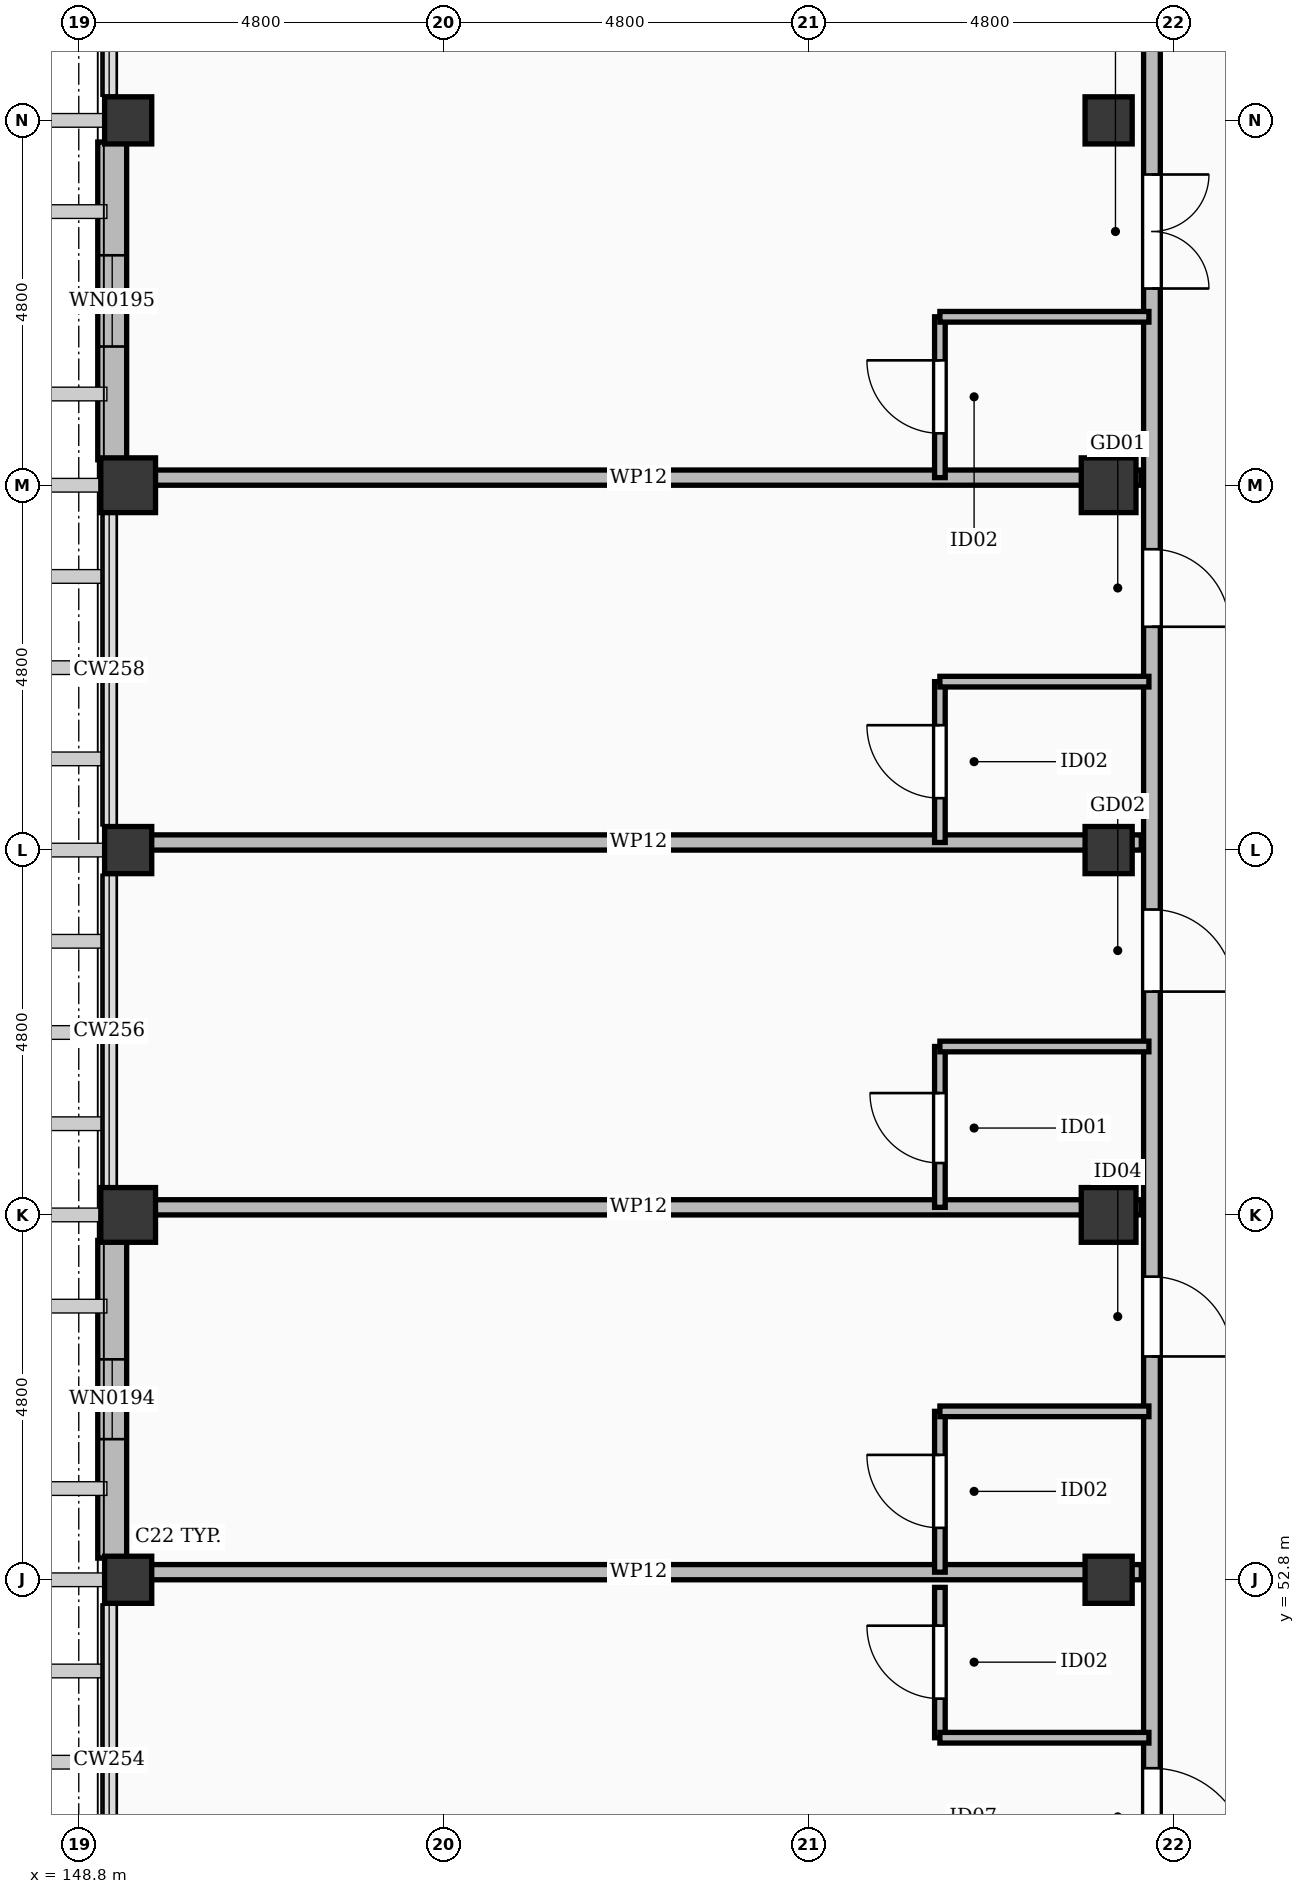
"""IFC4 building model, lengths in metres.
Left out: names, types, materials, properties, quantities, classifications, styles, units other than length and angle.
Written with IfcOpenShell. Run it as: python <this file> out.ifc"""

import sys

from ifc_helpers import new_model, si_unit, direction, frame, frame_2d, origin, origin_2d, place, context, subcontext, project, spatial, rectangle, extrude, element, fill, save


model = new_model("IFC4")
c1 = context("Model", 3, precision=1e-05, world=origin(), true_north=direction((0.0, 1.0)))
c2 = subcontext(c1, "Body", "Model", "MODEL_VIEW")
j1 = project(units=[si_unit("LENGTHUNIT", "METRE"), si_unit("PLANEANGLEUNIT", "RADIAN")], contexts=[c1])
p1 = place(None, origin())
s1 = spatial("IfcSite", under=j1, at=p1, CompositionType="ELEMENT")
p2 = place(p1, origin())
s2 = spatial("IfcBuilding", under=s1, at=p2, CompositionType="ELEMENT")
p3 = place(p2, frame((0.0, 0.0, 31.8)))
s3 = spatial("IfcBuildingStorey", under=s2, at=p3, CompositionType="ELEMENT", Elevation=31.8)
for number, where, z_axis, x_axis in (
    (1, (149.45, 57.6, 0.0), (0.0, 0.0, 1.0), (1.0, 0.0, 0.0)),
    (2, (149.45, 67.2, 0.0), (0.0, 0.0, 1.0), (1.0, 0.0, 0.0)),
    (3, (162.35, 57.6, 0.0), (0.0, 0.0, 1.0), (1.0, 0.0, 0.0)),
    (4, (162.35, 67.2, 0.0), (0.0, 0.0, 1.0), (1.0, 0.0, 0.0)),
):
    element("IfcColumn", number, at=place(p3, frame(where, z_axis=z_axis, x_axis=x_axis)), inside=s3, PredefinedType="COLUMN", context=c2, shape_type="SweptSolid", body=[
        extrude(rectangle(XDim=0.72, YDim=0.72, at=origin_2d()), origin(), (0.0, 0.0, 1.0), 3.6),
    ])
for number, where, z_axis, x_axis in (
    (5, (149.45, 52.8, 0.0), (0.0, 0.0, 1.0), (1.0, 0.0, 0.0)),
    (6, (149.45, 62.4, 0.0), (0.0, 0.0, 1.0), (1.0, 0.0, 0.0)),
    (7, (149.45, 72.0, 0.0), (0.0, 0.0, 1.0), (1.0, 0.0, 0.0)),
    (8, (162.35, 52.8, 0.0), (0.0, 0.0, 1.0), (1.0, 0.0, 0.0)),
    (9, (162.35, 62.4, 0.0), (0.0, 0.0, 1.0), (1.0, 0.0, 0.0)),
    (10, (162.35, 72.0, 0.0), (0.0, 0.0, 1.0), (1.0, 0.0, 0.0)),
):
    element("IfcColumn", number, at=place(p3, frame(where, z_axis=z_axis, x_axis=x_axis)), inside=s3, PredefinedType="COLUMN", context=c2, shape_type="SweptSolid", body=[
        extrude(rectangle(XDim=0.62, YDim=0.62, at=origin_2d()), origin(), (0.0, 0.0, 1.0), 3.6),
    ])
p4 = place(p3, frame((149.24, 53.085, 0.0), z_axis=(0.0, 0.0, 1.0), x_axis=(0.0, 1.0, 0.0)))
e11 = element("IfcWall", 11, at=p4, inside=s3, PredefinedType="SOLIDWALL", context=c2, shape_type="SweptSolid", body=[
    extrude(rectangle(XDim=4.18, YDim=0.38, at=frame_2d((2.09, 0.0))), origin(), (0.0, 0.0, 1.0), 2.732),
])
p5 = place(p4, frame((1.565, 0.0, 0.55)))
e12 = element("IfcOpeningElement", 12, at=p5, cuts=e11, PredefinedType="OPENING", context=c2, shape_type="SweptSolid", body=[
    extrude(rectangle(XDim=1.05, YDim=1.65, at=frame_2d((0.525, 0.825))), frame((0.0, 0.202, 0.0), z_axis=(0.0, -1.0, 0.0), x_axis=(1.0, 0.0, 0.0)), (0.0, 0.0, 1.0), 0.404),
])
p6 = place(p3, frame((149.24, 67.535, 0.0), z_axis=(0.0, 0.0, 1.0), x_axis=(0.0, 1.0, 0.0)))
e13 = element("IfcWall", 13, at=p6, inside=s3, PredefinedType="SOLIDWALL", context=c2, shape_type="SweptSolid", body=[
    extrude(rectangle(XDim=4.18, YDim=0.38, at=frame_2d((2.09, 0.0))), origin(), (0.0, 0.0, 1.0), 2.732),
])
p7 = place(p6, frame((1.49, 0.0, 0.55)))
e14 = element("IfcOpeningElement", 14, at=p7, cuts=e13, PredefinedType="OPENING", context=c2, shape_type="SweptSolid", body=[
    extrude(rectangle(XDim=1.2, YDim=1.72, at=frame_2d((0.6, 0.86))), frame((0.0, 0.202, 0.0), z_axis=(0.0, -1.0, 0.0), x_axis=(1.0, 0.0, 0.0)), (0.0, 0.0, 1.0), 0.404),
])
p8 = place(p3, frame((162.92, 48.35, 0.0), z_axis=(0.0, 0.0, 1.0), x_axis=(0.0, 1.0, 0.0)))
e15 = element("IfcWall", 15, at=p8, inside=s3, PredefinedType="PARTITIONING", context=c2, shape_type="SweptSolid", body=[
    extrude(rectangle(XDim=24.85, YDim=0.22, at=frame_2d((12.425, 0.0))), origin(), (0.0, 0.0, 1.0), 2.732),
])
p9 = place(p8, frame((0.691, 0.0, 0.0)))
e16 = element("IfcOpeningElement", 16, at=p9, cuts=e15, PredefinedType="OPENING", context=c2, shape_type="SweptSolid", body=[
    extrude(rectangle(XDim=1.28, YDim=2.16, at=frame_2d((0.64, 1.08))), frame((0.0, 0.122, 0.0), z_axis=(0.0, -1.0, 0.0), x_axis=(1.0, 0.0, 0.0)), (0.0, 0.0, 1.0), 0.244),
])
p10 = place(p8, frame((7.388, 0.0, 0.0)))
e17 = element("IfcOpeningElement", 17, at=p10, cuts=e15, PredefinedType="OPENING", context=c2, shape_type="SweptSolid", body=[
    extrude(rectangle(XDim=1.05, YDim=2.18, at=frame_2d((0.525, 1.09))), frame((0.0, 0.122, 0.0), z_axis=(0.0, -1.0, 0.0), x_axis=(1.0, 0.0, 0.0)), (0.0, 0.0, 1.0), 0.244),
])
p11 = place(p8, frame((12.188, 0.0, 0.0)))
e18 = element("IfcOpeningElement", 18, at=p11, cuts=e15, PredefinedType="OPENING", context=c2, shape_type="SweptSolid", body=[
    extrude(rectangle(XDim=1.08, YDim=2.25, at=frame_2d((0.54, 1.125))), frame((0.0, 0.122, 0.0), z_axis=(0.0, -1.0, 0.0), x_axis=(1.0, 0.0, 0.0)), (0.0, 0.0, 1.0), 0.244),
])
p12 = place(p8, frame((16.988, 0.0, 0.0)))
e19 = element("IfcOpeningElement", 19, at=p12, cuts=e15, PredefinedType="OPENING", context=c2, shape_type="SweptSolid", body=[
    extrude(rectangle(XDim=1.02, YDim=2.2, at=frame_2d((0.51, 1.1))), frame((0.0, 0.122, 0.0), z_axis=(0.0, -1.0, 0.0), x_axis=(1.0, 0.0, 0.0)), (0.0, 0.0, 1.0), 0.244),
])
p13 = place(p8, frame((21.438, 0.0, 0.0)))
e20 = element("IfcOpeningElement", 20, at=p13, cuts=e15, PredefinedType="OPENING", context=c2, shape_type="SweptSolid", body=[
    extrude(rectangle(XDim=1.5, YDim=2.3, at=frame_2d((0.75, 1.15))), frame((0.0, 0.122, 0.0), z_axis=(0.0, -1.0, 0.0), x_axis=(1.0, 0.0, 0.0)), (0.0, 0.0, 1.0), 0.244),
])
p14 = place(p3, frame((160.13, 50.722, 0.0), z_axis=(0.0, 0.0, 1.0), x_axis=(0.0, 1.0, 0.0)))
e21 = element("IfcWall", 21, at=p14, inside=s3, PredefinedType="PARTITIONING", context=c2, shape_type="SweptSolid", body=[
    extrude(rectangle(XDim=1.978, YDim=0.14, at=frame_2d((0.989, 0.0))), origin(), (0.0, 0.0, 1.0), 2.732),
])
p15 = place(p14, frame((0.514, 0.0, 0.0)))
e22 = element("IfcOpeningElement", 22, at=p15, cuts=e21, PredefinedType="OPENING", context=c2, shape_type="SweptSolid", body=[
    extrude(rectangle(XDim=0.96, YDim=2.12, at=frame_2d((0.48, 1.06))), frame((0.0, 0.082, 0.0), z_axis=(0.0, -1.0, 0.0), x_axis=(1.0, 0.0, 0.0)), (0.0, 0.0, 1.0), 0.164),
])
p16 = place(p3, frame((160.13, 50.722, 0.0), z_axis=(0.0, 0.0, 1.0), x_axis=(1.0, 0.0, 0.0)))
e23 = element("IfcWall", 23, at=p16, inside=s3, PredefinedType="PARTITIONING", context=c2, shape_type="SweptSolid", body=[
    extrude(rectangle(XDim=2.75, YDim=0.14, at=frame_2d((1.375, 0.0))), origin(), (0.0, 0.0, 1.0), 2.732),
])
p17 = place(p3, frame((149.55, 52.9, 0.0), z_axis=(0.0, 0.0, 1.0), x_axis=(1.0, 0.0, 0.0)))
e24 = element("IfcWall", 24, at=p17, inside=s3, PredefinedType="PARTITIONING", context=c2, shape_type="SweptSolid", body=[
    extrude(rectangle(XDim=13.23, YDim=0.2, at=frame_2d((6.615, 0.0))), origin(), (0.0, 0.0, 1.0), 2.732),
])
p18 = place(p3, frame((160.13, 52.9, 0.0), z_axis=(0.0, 0.0, 1.0), x_axis=(0.0, 1.0, 0.0)))
e25 = element("IfcWall", 25, at=p18, inside=s3, PredefinedType="PARTITIONING", context=c2, shape_type="SweptSolid", body=[
    extrude(rectangle(XDim=2.116, YDim=0.14, at=frame_2d((1.058, 0.0))), origin(), (0.0, 0.0, 1.0), 2.732),
])
p19 = place(p18, frame((0.583, 0.0, 0.0)))
e26 = element("IfcOpeningElement", 26, at=p19, cuts=e25, PredefinedType="OPENING", context=c2, shape_type="SweptSolid", body=[
    extrude(rectangle(XDim=0.96, YDim=2.12, at=frame_2d((0.48, 1.06))), frame((0.0, 0.082, 0.0), z_axis=(0.0, -1.0, 0.0), x_axis=(1.0, 0.0, 0.0)), (0.0, 0.0, 1.0), 0.164),
])
p20 = place(p3, frame((160.13, 55.016, 0.0), z_axis=(0.0, 0.0, 1.0), x_axis=(1.0, 0.0, 0.0)))
e27 = element("IfcWall", 27, at=p20, inside=s3, PredefinedType="PARTITIONING", context=c2, shape_type="SweptSolid", body=[
    extrude(rectangle(XDim=2.75, YDim=0.14, at=frame_2d((1.375, 0.0))), origin(), (0.0, 0.0, 1.0), 2.732),
])
p21 = place(p3, frame((149.55, 57.7, 0.0), z_axis=(0.0, 0.0, 1.0), x_axis=(1.0, 0.0, 0.0)))
e28 = element("IfcWall", 28, at=p21, inside=s3, PredefinedType="PARTITIONING", context=c2, shape_type="SweptSolid", body=[
    extrude(rectangle(XDim=13.23, YDim=0.2, at=frame_2d((6.615, 0.0))), origin(), (0.0, 0.0, 1.0), 2.732),
])
p22 = place(p3, frame((160.13, 57.7, 0.0), z_axis=(0.0, 0.0, 1.0), x_axis=(0.0, 1.0, 0.0)))
e29 = element("IfcWall", 29, at=p22, inside=s3, PredefinedType="PARTITIONING", context=c2, shape_type="SweptSolid", body=[
    extrude(rectangle(XDim=2.116, YDim=0.14, at=frame_2d((1.058, 0.0))), origin(), (0.0, 0.0, 1.0), 2.732),
])
p23 = place(p22, frame((0.583, 0.0, 0.0)))
e30 = element("IfcOpeningElement", 30, at=p23, cuts=e29, PredefinedType="OPENING", context=c2, shape_type="SweptSolid", body=[
    extrude(rectangle(XDim=0.92, YDim=2.1, at=frame_2d((0.46, 1.05))), frame((0.0, 0.082, 0.0), z_axis=(0.0, -1.0, 0.0), x_axis=(1.0, 0.0, 0.0)), (0.0, 0.0, 1.0), 0.164),
])
p24 = place(p3, frame((160.13, 59.816, 0.0), z_axis=(0.0, 0.0, 1.0), x_axis=(1.0, 0.0, 0.0)))
e31 = element("IfcWall", 31, at=p24, inside=s3, PredefinedType="PARTITIONING", context=c2, shape_type="SweptSolid", body=[
    extrude(rectangle(XDim=2.75, YDim=0.14, at=frame_2d((1.375, 0.0))), origin(), (0.0, 0.0, 1.0), 2.732),
])
p25 = place(p3, frame((149.55, 62.5, 0.0), z_axis=(0.0, 0.0, 1.0), x_axis=(1.0, 0.0, 0.0)))
e32 = element("IfcWall", 32, at=p25, inside=s3, PredefinedType="PARTITIONING", context=c2, shape_type="SweptSolid", body=[
    extrude(rectangle(XDim=13.23, YDim=0.2, at=frame_2d((6.615, 0.0))), origin(), (0.0, 0.0, 1.0), 2.732),
])
p26 = place(p3, frame((160.13, 62.5, 0.0), z_axis=(0.0, 0.0, 1.0), x_axis=(0.0, 1.0, 0.0)))
e33 = element("IfcWall", 33, at=p26, inside=s3, PredefinedType="PARTITIONING", context=c2, shape_type="SweptSolid", body=[
    extrude(rectangle(XDim=2.116, YDim=0.14, at=frame_2d((1.058, 0.0))), origin(), (0.0, 0.0, 1.0), 2.732),
])
p27 = place(p26, frame((0.583, 0.0, 0.0)))
e34 = element("IfcOpeningElement", 34, at=p27, cuts=e33, PredefinedType="OPENING", context=c2, shape_type="SweptSolid", body=[
    extrude(rectangle(XDim=0.96, YDim=2.12, at=frame_2d((0.48, 1.06))), frame((0.0, 0.082, 0.0), z_axis=(0.0, -1.0, 0.0), x_axis=(1.0, 0.0, 0.0)), (0.0, 0.0, 1.0), 0.164),
])
p28 = place(p3, frame((160.13, 64.616, 0.0), z_axis=(0.0, 0.0, 1.0), x_axis=(1.0, 0.0, 0.0)))
e35 = element("IfcWall", 35, at=p28, inside=s3, PredefinedType="PARTITIONING", context=c2, shape_type="SweptSolid", body=[
    extrude(rectangle(XDim=2.75, YDim=0.14, at=frame_2d((1.375, 0.0))), origin(), (0.0, 0.0, 1.0), 2.732),
])
p29 = place(p3, frame((149.55, 67.3, 0.0), z_axis=(0.0, 0.0, 1.0), x_axis=(1.0, 0.0, 0.0)))
e36 = element("IfcWall", 36, at=p29, inside=s3, PredefinedType="PARTITIONING", context=c2, shape_type="SweptSolid", body=[
    extrude(rectangle(XDim=13.23, YDim=0.2, at=frame_2d((6.615, 0.0))), origin(), (0.0, 0.0, 1.0), 2.732),
])
p30 = place(p3, frame((160.13, 67.3, 0.0), z_axis=(0.0, 0.0, 1.0), x_axis=(0.0, 1.0, 0.0)))
e37 = element("IfcWall", 37, at=p30, inside=s3, PredefinedType="PARTITIONING", context=c2, shape_type="SweptSolid", body=[
    extrude(rectangle(XDim=2.116, YDim=0.14, at=frame_2d((1.058, 0.0))), origin(), (0.0, 0.0, 1.0), 2.732),
])
p31 = place(p30, frame((0.583, 0.0, 0.0)))
e38 = element("IfcOpeningElement", 38, at=p31, cuts=e37, PredefinedType="OPENING", context=c2, shape_type="SweptSolid", body=[
    extrude(rectangle(XDim=0.96, YDim=2.12, at=frame_2d((0.48, 1.06))), frame((0.0, 0.082, 0.0), z_axis=(0.0, -1.0, 0.0), x_axis=(1.0, 0.0, 0.0)), (0.0, 0.0, 1.0), 0.164),
])
p32 = place(p3, frame((160.13, 69.416, 0.0), z_axis=(0.0, 0.0, 1.0), x_axis=(1.0, 0.0, 0.0)))
e39 = element("IfcWall", 39, at=p32, inside=s3, PredefinedType="PARTITIONING", context=c2, shape_type="SweptSolid", body=[
    extrude(rectangle(XDim=2.75, YDim=0.14, at=frame_2d((1.375, 0.0))), origin(), (0.0, 0.0, 1.0), 2.732),
])
p33 = place(p5, origin())
e40 = element("IfcWindow", 40, at=p33, inside=s3, PartitioningType="SINGLE_PANEL", PredefinedType="WINDOW", context=c2, shape_type="SweptSolid", body=[
    extrude(rectangle(XDim=1.05, YDim=1.65, at=frame_2d((0.525, 0.825))), frame((0.0, 0.03, 0.0), z_axis=(0.0, -1.0, 0.0), x_axis=(1.0, 0.0, 0.0)), (0.0, 0.0, 1.0), 0.06),
])
fill(e12, e40)
p34 = place(p7, origin())
e41 = element("IfcWindow", 41, at=p34, inside=s3, PartitioningType="SINGLE_PANEL", PredefinedType="WINDOW", context=c2, shape_type="SweptSolid", body=[
    extrude(rectangle(XDim=1.2, YDim=1.72, at=frame_2d((0.6, 0.86))), frame((0.0, 0.03, 0.0), z_axis=(0.0, -1.0, 0.0), x_axis=(1.0, 0.0, 0.0)), (0.0, 0.0, 1.0), 0.06),
])
fill(e14, e41)
p35 = place(p9, frame((1.28, 0.0, 0.0), z_axis=(0.0, 0.0, 1.0), x_axis=(-1.0, 0.0, 0.0)))
e42 = element("IfcDoor", 42, at=p35, inside=s3, OperationType="SINGLE_SWING_LEFT", PredefinedType="DOOR", context=c2, shape_type="SweptSolid", body=[
    extrude(rectangle(XDim=1.28, YDim=2.16, at=frame_2d((0.64, 1.08))), frame((0.0, 0.025, 0.0), z_axis=(0.0, -1.0, 0.0), x_axis=(1.0, 0.0, 0.0)), (0.0, 0.0, 1.0), 0.05),
])
fill(e16, e42)
p36 = place(p15, origin())
e43 = element("IfcDoor", 43, at=p36, inside=s3, OperationType="SINGLE_SWING_RIGHT", PredefinedType="DOOR", context=c2, shape_type="SweptSolid", body=[
    extrude(rectangle(XDim=0.96, YDim=2.12, at=frame_2d((0.48, 1.06))), frame((0.0, 0.025, 0.0), z_axis=(0.0, -1.0, 0.0), x_axis=(1.0, 0.0, 0.0)), (0.0, 0.0, 1.0), 0.05),
])
fill(e22, e43)
p37 = place(p10, frame((1.05, 0.0, 0.0), z_axis=(0.0, 0.0, 1.0), x_axis=(-1.0, 0.0, 0.0)))
e44 = element("IfcDoor", 44, at=p37, inside=s3, OperationType="SINGLE_SWING_LEFT", PredefinedType="DOOR", context=c2, shape_type="SweptSolid", body=[
    extrude(rectangle(XDim=1.05, YDim=2.18, at=frame_2d((0.525, 1.09))), frame((0.0, 0.025, 0.0), z_axis=(0.0, -1.0, 0.0), x_axis=(1.0, 0.0, 0.0)), (0.0, 0.0, 1.0), 0.05),
])
fill(e17, e44)
p38 = place(p19, origin())
e45 = element("IfcDoor", 45, at=p38, inside=s3, OperationType="SINGLE_SWING_RIGHT", PredefinedType="DOOR", context=c2, shape_type="SweptSolid", body=[
    extrude(rectangle(XDim=0.96, YDim=2.12, at=frame_2d((0.48, 1.06))), frame((0.0, 0.025, 0.0), z_axis=(0.0, -1.0, 0.0), x_axis=(1.0, 0.0, 0.0)), (0.0, 0.0, 1.0), 0.05),
])
fill(e26, e45)
p39 = place(p11, frame((1.08, 0.0, 0.0), z_axis=(0.0, 0.0, 1.0), x_axis=(-1.0, 0.0, 0.0)))
e46 = element("IfcDoor", 46, at=p39, inside=s3, OperationType="SINGLE_SWING_LEFT", PredefinedType="DOOR", context=c2, shape_type="SweptSolid", body=[
    extrude(rectangle(XDim=1.08, YDim=2.25, at=frame_2d((0.54, 1.125))), frame((0.0, 0.025, 0.0), z_axis=(0.0, -1.0, 0.0), x_axis=(1.0, 0.0, 0.0)), (0.0, 0.0, 1.0), 0.05),
])
fill(e18, e46)
p40 = place(p23, origin())
e47 = element("IfcDoor", 47, at=p40, inside=s3, OperationType="SINGLE_SWING_RIGHT", PredefinedType="DOOR", context=c2, shape_type="SweptSolid", body=[
    extrude(rectangle(XDim=0.92, YDim=2.1, at=frame_2d((0.46, 1.05))), frame((0.0, 0.025, 0.0), z_axis=(0.0, -1.0, 0.0), x_axis=(1.0, 0.0, 0.0)), (0.0, 0.0, 1.0), 0.05),
])
fill(e30, e47)
p41 = place(p12, frame((1.02, 0.0, 0.0), z_axis=(0.0, 0.0, 1.0), x_axis=(-1.0, 0.0, 0.0)))
e48 = element("IfcDoor", 48, at=p41, inside=s3, OperationType="SINGLE_SWING_LEFT", PredefinedType="DOOR", context=c2, shape_type="SweptSolid", body=[
    extrude(rectangle(XDim=1.02, YDim=2.2, at=frame_2d((0.51, 1.1))), frame((0.0, 0.025, 0.0), z_axis=(0.0, -1.0, 0.0), x_axis=(1.0, 0.0, 0.0)), (0.0, 0.0, 1.0), 0.05),
])
fill(e19, e48)
p42 = place(p27, origin())
e49 = element("IfcDoor", 49, at=p42, inside=s3, OperationType="SINGLE_SWING_RIGHT", PredefinedType="DOOR", context=c2, shape_type="SweptSolid", body=[
    extrude(rectangle(XDim=0.96, YDim=2.12, at=frame_2d((0.48, 1.06))), frame((0.0, 0.025, 0.0), z_axis=(0.0, -1.0, 0.0), x_axis=(1.0, 0.0, 0.0)), (0.0, 0.0, 1.0), 0.05),
])
fill(e34, e49)
p43 = place(p13, frame((1.5, 0.0, 0.0), z_axis=(0.0, 0.0, 1.0), x_axis=(-1.0, 0.0, 0.0)))
e50 = element("IfcDoor", 50, at=p43, inside=s3, OperationType="DOUBLE_DOOR_SINGLE_SWING", PredefinedType="DOOR", context=c2, shape_type="SweptSolid", body=[
    extrude(rectangle(XDim=1.5, YDim=2.3, at=frame_2d((0.75, 1.15))), frame((0.0, 0.025, 0.0), z_axis=(0.0, -1.0, 0.0), x_axis=(1.0, 0.0, 0.0)), (0.0, 0.0, 1.0), 0.05),
])
fill(e20, e50)
p44 = place(p31, origin())
e51 = element("IfcDoor", 51, at=p44, inside=s3, OperationType="SINGLE_SWING_RIGHT", PredefinedType="DOOR", context=c2, shape_type="SweptSolid", body=[
    extrude(rectangle(XDim=0.96, YDim=2.12, at=frame_2d((0.48, 1.06))), frame((0.0, 0.025, 0.0), z_axis=(0.0, -1.0, 0.0), x_axis=(1.0, 0.0, 0.0)), (0.0, 0.0, 1.0), 0.05),
])
fill(e38, e51)
save(model, sys.argv[1])
